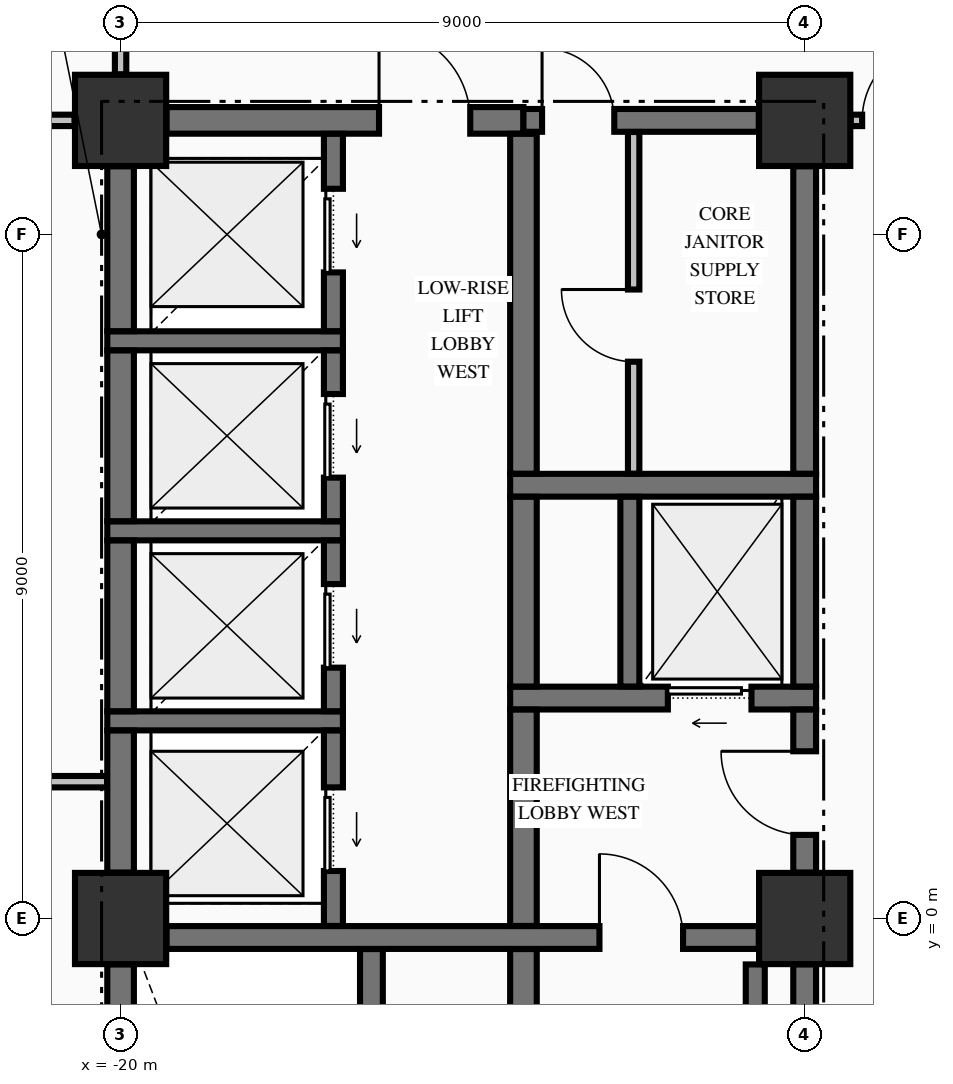
"""IFC4 building model, lengths in metres.
Left out: names, types, materials, properties, quantities, classifications, styles, units other than length and angle.
Written with IfcOpenShell. Run it as: python <this file> out.ifc"""

import sys

from ifc_helpers import new_model, si_unit, direction, frame, frame_2d, origin, origin_2d, place, context, subcontext, project, spatial, rectangle, extrude, element, fill, save


model = new_model("IFC4")
c1 = context("Model", 3, precision=1e-05, world=origin(), true_north=direction((0.0, 1.0)))
c2 = subcontext(c1, "Body", "Model", "MODEL_VIEW")
j1 = project(units=[si_unit("LENGTHUNIT", "METRE"), si_unit("PLANEANGLEUNIT", "RADIAN")], contexts=[c1])
p1 = place(None, origin())
s1 = spatial("IfcSite", under=j1, at=p1, CompositionType="ELEMENT")
p2 = place(p1, origin())
s2 = spatial("IfcBuilding", under=s1, at=p2, CompositionType="ELEMENT")
p3 = place(p2, frame((0.0, 0.0, 64.33)))
s3 = spatial("IfcBuildingStorey", under=s2, at=p3, CompositionType="ELEMENT", Elevation=64.33)
for number, where, z_axis, x_axis in (
    (1, (-20.0, 10.5, -0.25), (0.0, 0.0, 1.0), (1.0, 0.0, 0.0)),
    (2, (-11.0, 0.0, -0.25), (0.0, 0.0, 1.0), (1.0, 0.0, 0.0)),
    (3, (-11.0, 10.5, -0.25), (0.0, 0.0, 1.0), (1.0, 0.0, 0.0)),
    (4, (-20.0, 0.0, -0.25), (0.0, 0.0, 1.0), (1.0, 0.0, 0.0)),
):
    element("IfcColumn", number, at=place(p3, frame(where, z_axis=z_axis, x_axis=x_axis)), inside=s3, PredefinedType="COLUMN", context=c2, shape_type="SweptSolid", body=[
        extrude(rectangle(XDim=1.2, YDim=1.2, at=origin_2d()), origin(), (0.0, 0.0, 1.0), 3.57),
    ])
p4 = place(p3, frame((-19.396, -0.25, 0.0), z_axis=(0.0, 0.0, 1.0), x_axis=(1.0, 0.0, 0.0)))
e5 = element("IfcWall", 5, at=p4, inside=s3, PredefinedType="SHEAR", context=c2, shape_type="SweptSolid", body=[
    extrude(rectangle(XDim=7.792, YDim=0.3, at=frame_2d((3.896, 0.0))), origin(), (0.0, 0.0, 1.0), 3.32),
])
p5 = place(p4, frame((5.696, 0.0, 0.0)))
e6 = element("IfcOpeningElement", 6, at=p5, cuts=e5, PredefinedType="OPENING", context=c2, shape_type="SweptSolid", body=[
    extrude(rectangle(XDim=1.1, YDim=2.15, at=frame_2d((0.55, 1.075))), frame((0.0, 0.16, 0.0), z_axis=(0.0, -1.0, 0.0), x_axis=(1.0, 0.0, 0.0)), (0.0, 0.0, 1.0), 0.32),
])
p6 = place(p3, frame((-20.175, 2.6, 0.0), z_axis=(0.0, 0.0, 1.0), x_axis=(1.0, 0.0, 0.0)))
e7 = element("IfcWall", 7, at=p6, inside=s3, PredefinedType="SOLIDWALL", context=c2, shape_type="SweptSolid", body=[
    extrude(rectangle(XDim=3.1, YDim=0.25, at=frame_2d((1.55, 0.0))), origin(), (0.0, 0.0, 1.0), 3.32),
])
p7 = place(p3, frame((-14.875, 2.9, 0.0), z_axis=(0.0, 0.0, 1.0), x_axis=(1.0, 0.0, 0.0)))
e8 = element("IfcWall", 8, at=p7, inside=s3, PredefinedType="SHEAR", context=c2, shape_type="SweptSolid", body=[
    extrude(rectangle(XDim=4.025, YDim=0.3, at=frame_2d((2.012, 0.0))), origin(), (0.0, 0.0, 1.0), 3.32),
])
p8 = place(p7, frame((2.075, 0.0, 0.0)))
e9 = element("IfcOpeningElement", 9, at=p8, cuts=e8, PredefinedType="OPENING", context=c2, shape_type="SweptSolid", body=[
    extrude(rectangle(XDim=1.1, YDim=2.2, at=frame_2d((0.55, 1.1))), frame((0.0, 0.16, 0.0), z_axis=(0.0, -1.0, 0.0), x_axis=(1.0, 0.0, 0.0)), (0.0, 0.0, 1.0), 0.32),
])
p9 = place(p3, frame((-20.175, 5.1, 0.0), z_axis=(0.0, 0.0, 1.0), x_axis=(1.0, 0.0, 0.0)))
e10 = element("IfcWall", 10, at=p9, inside=s3, PredefinedType="SOLIDWALL", context=c2, shape_type="SweptSolid", body=[
    extrude(rectangle(XDim=3.1, YDim=0.25, at=frame_2d((1.55, 0.0))), origin(), (0.0, 0.0, 1.0), 3.32),
])
p10 = place(p3, frame((-14.875, 5.7, 0.0), z_axis=(0.0, 0.0, 1.0), x_axis=(1.0, 0.0, 0.0)))
e11 = element("IfcWall", 11, at=p10, inside=s3, PredefinedType="SHEAR", context=c2, shape_type="SweptSolid", body=[
    extrude(rectangle(XDim=4.025, YDim=0.3, at=frame_2d((2.012, 0.0))), origin(), (0.0, 0.0, 1.0), 3.32),
])
p11 = place(p3, frame((-20.175, 7.6, 0.0), z_axis=(0.0, 0.0, 1.0), x_axis=(1.0, 0.0, 0.0)))
e12 = element("IfcWall", 12, at=p11, inside=s3, PredefinedType="SOLIDWALL", context=c2, shape_type="SweptSolid", body=[
    extrude(rectangle(XDim=3.1, YDim=0.25, at=frame_2d((1.55, 0.0))), origin(), (0.0, 0.0, 1.0), 3.32),
])
p12 = place(p3, frame((-19.396, 10.5, 0.0), z_axis=(0.0, 0.0, 1.0), x_axis=(1.0, 0.0, 0.0)))
e13 = element("IfcWall", 13, at=p12, inside=s3, PredefinedType="SHEAR", context=c2, shape_type="SweptSolid", body=[
    extrude(rectangle(XDim=4.696, YDim=0.35, at=frame_2d((2.348, 0.0))), origin(), (0.0, 0.0, 1.0), 3.32),
])
p13 = place(p12, frame((2.796, 0.0, 0.0)))
e14 = element("IfcOpeningElement", 14, at=p13, cuts=e13, PredefinedType="OPENING", context=c2, shape_type="SweptSolid", body=[
    extrude(rectangle(XDim=1.2, YDim=2.15, at=frame_2d((0.6, 1.075))), frame((0.0, 0.185, 0.0), z_axis=(0.0, -1.0, 0.0), x_axis=(1.0, 0.0, 0.0)), (0.0, 0.0, 1.0), 0.37),
])
p14 = place(p3, frame((-14.7, 10.5, 0.0), z_axis=(0.0, 0.0, 1.0), x_axis=(1.0, 0.0, 0.0)))
e15 = element("IfcWall", 15, at=p14, inside=s3, PredefinedType="SHEAR", context=c2, shape_type="SweptSolid", body=[
    extrude(rectangle(XDim=3.096, YDim=0.3, at=frame_2d((1.548, 0.0))), origin(), (0.0, 0.0, 1.0), 3.32),
])
p15 = place(p14, frame((0.245, 0.0, 0.0)))
e16 = element("IfcOpeningElement", 16, at=p15, cuts=e15, PredefinedType="OPENING", context=c2, shape_type="SweptSolid", body=[
    extrude(rectangle(XDim=0.95, YDim=2.15, at=frame_2d((0.475, 1.075))), frame((0.0, 0.16, 0.0), z_axis=(0.0, -1.0, 0.0), x_axis=(1.0, 0.0, 0.0)), (0.0, 0.0, 1.0), 0.32),
])
p16 = place(p3, frame((-28.835, 1.8, 0.0), z_axis=(0.0, 0.0, 1.0), x_axis=(1.0, 0.0, 0.0)))
e17 = element("IfcWall", 17, at=p16, inside=s3, PredefinedType="PARTITIONING", context=c2, shape_type="SweptSolid", body=[
    extrude(rectangle(XDim=8.657, YDim=0.15, at=frame_2d((4.329, 0.0))), origin(), (0.0, 0.0, 1.0), 3.32),
])
p17 = place(p3, frame((-28.835, 10.5, 0.0), z_axis=(0.0, 0.0, 1.0), x_axis=(1.0, 0.0, 0.0)))
e18 = element("IfcWall", 18, at=p17, inside=s3, PredefinedType="PARTITIONING", context=c2, shape_type="SweptSolid", body=[
    extrude(rectangle(XDim=8.229, YDim=0.15, at=frame_2d((4.115, 0.0))), origin(), (0.0, 0.0, 1.0), 3.32),
])
p18 = place(p17, frame((3.86, 0.0, 0.0)))
e19 = element("IfcOpeningElement", 19, at=p18, cuts=e18, PredefinedType="OPENING", context=c2, shape_type="SweptSolid", body=[
    extrude(rectangle(XDim=0.95, YDim=2.15, at=frame_2d((0.475, 1.075))), frame((0.0, 0.085, 0.0), z_axis=(0.0, -1.0, 0.0), x_axis=(1.0, 0.0, 0.0)), (0.0, 0.0, 1.0), 0.17),
])
p19 = place(p3, frame((-10.394, 10.5, 0.0), z_axis=(0.0, 0.0, 1.0), x_axis=(1.0, 0.0, 0.0)))
e20 = element("IfcWall", 20, at=p19, inside=s3, PredefinedType="PARTITIONING", context=c2, shape_type="SweptSolid", body=[
    extrude(rectangle(XDim=20.788, YDim=0.15, at=frame_2d((10.394, 0.0))), origin(), (0.0, 0.0, 1.0), 3.32),
])
p20 = place(p19, frame((0.15, 0.0, 0.0)))
e21 = element("IfcOpeningElement", 21, at=p20, cuts=e20, PredefinedType="OPENING", context=c2, shape_type="SweptSolid", body=[
    extrude(rectangle(XDim=1.05, YDim=2.15, at=frame_2d((0.525, 1.075))), frame((0.0, 0.085, 0.0), z_axis=(0.0, -1.0, 0.0), x_axis=(1.0, 0.0, 0.0)), (0.0, 0.0, 1.0), 0.17),
])
p21 = place(p19, frame((19.588, 0.0, 0.0)))
e22 = element("IfcOpeningElement", 22, at=p21, cuts=e20, PredefinedType="OPENING", context=c2, shape_type="SweptSolid", body=[
    extrude(rectangle(XDim=1.05, YDim=2.15, at=frame_2d((0.525, 1.075))), frame((0.0, 0.085, 0.0), z_axis=(0.0, -1.0, 0.0), x_axis=(1.0, 0.0, 0.0)), (0.0, 0.0, 1.0), 0.17),
])
p22 = place(p3, frame((-20.0, -9.346, 0.0), z_axis=(0.0, 0.0, 1.0), x_axis=(0.0, 1.0, 0.0)))
e23 = element("IfcWall", 23, at=p22, inside=s3, PredefinedType="SHEAR", context=c2, shape_type="SweptSolid", body=[
    extrude(rectangle(XDim=8.742, YDim=0.35, at=frame_2d((4.371, 0.0))), origin(), (0.0, 0.0, 1.0), 3.32),
])
p23 = place(p3, frame((-20.0, 0.604, 0.0), z_axis=(0.0, 0.0, 1.0), x_axis=(0.0, 1.0, 0.0)))
e24 = element("IfcWall", 24, at=p23, inside=s3, PredefinedType="SHEAR", context=c2, shape_type="SweptSolid", body=[
    extrude(rectangle(XDim=1.869, YDim=0.35, at=frame_2d((0.935, 0.0))), origin(), (0.0, 0.0, 1.0), 3.32),
])
for number, where, z_axis, x_axis in (
    (25, (-20.0, 2.727, 0.0), (0.0, 0.0, 1.0), (0.0, 1.0, 0.0)),
    (26, (-20.0, 5.227, 0.0), (0.0, 0.0, 1.0), (0.0, 1.0, 0.0)),
):
    element("IfcWall", number, at=place(p3, frame(where, z_axis=z_axis, x_axis=x_axis)), inside=s3, PredefinedType="SHEAR", context=c2, shape_type="SweptSolid", body=[
        extrude(rectangle(XDim=2.246, YDim=0.35, at=frame_2d((1.123, 0.0))), origin(), (0.0, 0.0, 1.0), 3.32),
    ])
p24 = place(p3, frame((-20.0, 7.727, 0.0), z_axis=(0.0, 0.0, 1.0), x_axis=(0.0, 1.0, 0.0)))
e27 = element("IfcWall", 27, at=p24, inside=s3, PredefinedType="SHEAR", context=c2, shape_type="SweptSolid", body=[
    extrude(rectangle(XDim=2.169, YDim=0.35, at=frame_2d((1.084, 0.0))), origin(), (0.0, 0.0, 1.0), 3.32),
])
p25 = place(p3, frame((-17.2, -0.098, 0.0), z_axis=(0.0, 0.0, 1.0), x_axis=(0.0, 1.0, 0.0)))
e28 = element("IfcWall", 28, at=p25, inside=s3, PredefinedType="SOLIDWALL", context=c2, shape_type="SweptSolid", body=[
    extrude(rectangle(XDim=2.571, YDim=0.25, at=frame_2d((1.285, 0.0))), origin(), (0.0, 0.0, 1.0), 3.32),
])
p26 = place(p25, frame((0.723, 0.0, 0.0)))
e29 = element("IfcOpeningElement", 29, at=p26, cuts=e28, PredefinedType="OPENING", context=c2, shape_type="SweptSolid", body=[
    extrude(rectangle(XDim=1.1, YDim=2.2, at=frame_2d((0.55, 1.1))), frame((0.0, 0.135, 0.0), z_axis=(0.0, -1.0, 0.0), x_axis=(1.0, 0.0, 0.0)), (0.0, 0.0, 1.0), 0.27),
])
p27 = place(p3, frame((-17.2, 2.727, 0.0), z_axis=(0.0, 0.0, 1.0), x_axis=(0.0, 1.0, 0.0)))
e30 = element("IfcWall", 30, at=p27, inside=s3, PredefinedType="SOLIDWALL", context=c2, shape_type="SweptSolid", body=[
    extrude(rectangle(XDim=2.246, YDim=0.25, at=frame_2d((1.123, 0.0))), origin(), (0.0, 0.0, 1.0), 3.32),
])
p28 = place(p27, frame((0.573, 0.0, 0.0)))
e31 = element("IfcOpeningElement", 31, at=p28, cuts=e30, PredefinedType="OPENING", context=c2, shape_type="SweptSolid", body=[
    extrude(rectangle(XDim=1.1, YDim=2.2, at=frame_2d((0.55, 1.1))), frame((0.0, 0.135, 0.0), z_axis=(0.0, -1.0, 0.0), x_axis=(1.0, 0.0, 0.0)), (0.0, 0.0, 1.0), 0.27),
])
p29 = place(p3, frame((-17.2, 5.227, 0.0), z_axis=(0.0, 0.0, 1.0), x_axis=(0.0, 1.0, 0.0)))
e32 = element("IfcWall", 32, at=p29, inside=s3, PredefinedType="SOLIDWALL", context=c2, shape_type="SweptSolid", body=[
    extrude(rectangle(XDim=2.246, YDim=0.25, at=frame_2d((1.123, 0.0))), origin(), (0.0, 0.0, 1.0), 3.32),
])
p30 = place(p29, frame((0.573, 0.0, 0.0)))
e33 = element("IfcOpeningElement", 33, at=p30, cuts=e32, PredefinedType="OPENING", context=c2, shape_type="SweptSolid", body=[
    extrude(rectangle(XDim=1.1, YDim=2.2, at=frame_2d((0.55, 1.1))), frame((0.0, 0.135, 0.0), z_axis=(0.0, -1.0, 0.0), x_axis=(1.0, 0.0, 0.0)), (0.0, 0.0, 1.0), 0.27),
])
p31 = place(p3, frame((-17.2, 7.727, 0.0), z_axis=(0.0, 0.0, 1.0), x_axis=(0.0, 1.0, 0.0)))
e34 = element("IfcWall", 34, at=p31, inside=s3, PredefinedType="SOLIDWALL", context=c2, shape_type="SweptSolid", body=[
    extrude(rectangle(XDim=2.596, YDim=0.25, at=frame_2d((1.298, 0.0))), origin(), (0.0, 0.0, 1.0), 3.32),
])
p32 = place(p31, frame((0.773, 0.0, 0.0)))
e35 = element("IfcOpeningElement", 35, at=p32, cuts=e34, PredefinedType="OPENING", context=c2, shape_type="SweptSolid", body=[
    extrude(rectangle(XDim=1.1, YDim=2.2, at=frame_2d((0.55, 1.1))), frame((0.0, 0.135, 0.0), z_axis=(0.0, -1.0, 0.0), x_axis=(1.0, 0.0, 0.0)), (0.0, 0.0, 1.0), 0.27),
])
p33 = place(p3, frame((-16.7, -9.773, 0.0), z_axis=(0.0, 0.0, 1.0), x_axis=(0.0, 1.0, 0.0)))
e36 = element("IfcWall", 36, at=p33, inside=s3, PredefinedType="SHEAR", context=c2, shape_type="SweptSolid", body=[
    extrude(rectangle(XDim=9.371, YDim=0.3, at=frame_2d((4.686, 0.0))), origin(), (0.0, 0.0, 1.0), 3.32),
])
p34 = place(p3, frame((-14.7, -9.773, 0.0), z_axis=(0.0, 0.0, 1.0), x_axis=(0.0, 1.0, 0.0)))
e37 = element("IfcWall", 37, at=p34, inside=s3, PredefinedType="SHEAR", context=c2, shape_type="SweptSolid", body=[
    extrude(rectangle(XDim=9.371, YDim=0.35, at=frame_2d((4.686, 0.0))), origin(), (0.0, 0.0, 1.0), 3.32),
])
p35 = place(p3, frame((-14.7, -0.098, 0.0), z_axis=(0.0, 0.0, 1.0), x_axis=(0.0, 1.0, 0.0)))
e38 = element("IfcWall", 38, at=p35, inside=s3, PredefinedType="SHEAR", context=c2, shape_type="SweptSolid", body=[
    extrude(rectangle(XDim=2.846, YDim=0.35, at=frame_2d((1.423, 0.0))), origin(), (0.0, 0.0, 1.0), 3.32),
])
p36 = place(p3, frame((-14.7, 3.052, 0.0), z_axis=(0.0, 0.0, 1.0), x_axis=(0.0, 1.0, 0.0)))
e39 = element("IfcWall", 39, at=p36, inside=s3, PredefinedType="SHEAR", context=c2, shape_type="SweptSolid", body=[
    extrude(rectangle(XDim=2.496, YDim=0.35, at=frame_2d((1.248, 0.0))), origin(), (0.0, 0.0, 1.0), 3.32),
])
p37 = place(p3, frame((-14.7, 5.852, 0.0), z_axis=(0.0, 0.0, 1.0), x_axis=(0.0, 1.0, 0.0)))
e40 = element("IfcWall", 40, at=p37, inside=s3, PredefinedType="SHEAR", context=c2, shape_type="SweptSolid", body=[
    extrude(rectangle(XDim=4.471, YDim=0.35, at=frame_2d((2.235, 0.0))), origin(), (0.0, 0.0, 1.0), 3.32),
])
p38 = place(p3, frame((-13.3, 3.052, 0.0), z_axis=(0.0, 0.0, 1.0), x_axis=(0.0, 1.0, 0.0)))
e41 = element("IfcWall", 41, at=p38, inside=s3, PredefinedType="SOLIDWALL", context=c2, shape_type="SweptSolid", body=[
    extrude(rectangle(XDim=2.496, YDim=0.25, at=frame_2d((1.248, 0.0))), origin(), (0.0, 0.0, 1.0), 3.32),
])
p39 = place(p3, frame((-11.65, -9.346, 0.0), z_axis=(0.0, 0.0, 1.0), x_axis=(0.0, 1.0, 0.0)))
e42 = element("IfcWall", 42, at=p39, inside=s3, PredefinedType="SOLIDWALL", context=c2, shape_type="SweptSolid", body=[
    extrude(rectangle(XDim=8.742, YDim=0.25, at=frame_2d((4.371, 0.0))), origin(), (0.0, 0.0, 1.0), 3.32),
])
p40 = place(p3, frame((-11.0, -9.346, 0.0), z_axis=(0.0, 0.0, 1.0), x_axis=(0.0, 1.0, 0.0)))
e43 = element("IfcWall", 43, at=p40, inside=s3, PredefinedType="SHEAR", context=c2, shape_type="SweptSolid", body=[
    extrude(rectangle(XDim=8.742, YDim=0.3, at=frame_2d((4.371, 0.0))), origin(), (0.0, 0.0, 1.0), 3.32),
])
p41 = place(p3, frame((-11.0, 0.604, 0.0), z_axis=(0.0, 0.0, 1.0), x_axis=(0.0, 1.0, 0.0)))
e44 = element("IfcWall", 44, at=p41, inside=s3, PredefinedType="SHEAR", context=c2, shape_type="SweptSolid", body=[
    extrude(rectangle(XDim=2.144, YDim=0.3, at=frame_2d((1.072, 0.0))), origin(), (0.0, 0.0, 1.0), 3.32),
])
p42 = place(p41, frame((0.496, 0.0, 0.0)))
e45 = element("IfcOpeningElement", 45, at=p42, cuts=e44, PredefinedType="OPENING", context=c2, shape_type="SweptSolid", body=[
    extrude(rectangle(XDim=1.1, YDim=2.15, at=frame_2d((0.55, 1.075))), frame((0.0, 0.16, 0.0), z_axis=(0.0, -1.0, 0.0), x_axis=(1.0, 0.0, 0.0)), (0.0, 0.0, 1.0), 0.32),
])
p43 = place(p3, frame((-11.0, 3.052, 0.0), z_axis=(0.0, 0.0, 1.0), x_axis=(0.0, 1.0, 0.0)))
e46 = element("IfcWall", 46, at=p43, inside=s3, PredefinedType="SHEAR", context=c2, shape_type="SweptSolid", body=[
    extrude(rectangle(XDim=2.496, YDim=0.3, at=frame_2d((1.248, 0.0))), origin(), (0.0, 0.0, 1.0), 3.32),
])
p44 = place(p3, frame((-11.0, 5.852, 0.0), z_axis=(0.0, 0.0, 1.0), x_axis=(0.0, 1.0, 0.0)))
e47 = element("IfcWall", 47, at=p44, inside=s3, PredefinedType="SHEAR", context=c2, shape_type="SweptSolid", body=[
    extrude(rectangle(XDim=4.044, YDim=0.3, at=frame_2d((2.022, 0.0))), origin(), (0.0, 0.0, 1.0), 3.32),
])
p45 = place(p3, frame((-20.0, 11.106, 0.0), z_axis=(0.0, 0.0, 1.0), x_axis=(0.0, 1.0, 0.0)))
e48 = element("IfcWall", 48, at=p45, inside=s3, PredefinedType="PARTITIONING", context=c2, shape_type="SweptSolid", body=[
    extrude(rectangle(XDim=2.166, YDim=0.15, at=frame_2d((1.083, 0.0))), origin(), (0.0, 0.0, 1.0), 2.66),
])
p46 = place(p45, frame((0.349, 0.0, 0.0)))
e49 = element("IfcOpeningElement", 49, at=p46, cuts=e48, PredefinedType="OPENING", context=c2, shape_type="SweptSolid", body=[
    extrude(rectangle(XDim=0.95, YDim=2.15, at=frame_2d((0.475, 1.075))), frame((0.0, 0.085, 0.0), z_axis=(0.0, -1.0, 0.0), x_axis=(1.0, 0.0, 0.0)), (0.0, 0.0, 1.0), 0.17),
])
p47 = place(p3, frame((-13.25, 5.853, 0.0), z_axis=(0.0, 0.0, 1.0), x_axis=(0.0, 1.0, 0.0)))
e50 = element("IfcWall", 50, at=p47, inside=s3, PredefinedType="PARTITIONING", context=c2, shape_type="SweptSolid", body=[
    extrude(rectangle(XDim=4.494, YDim=0.15, at=frame_2d((2.247, 0.0))), origin(), (0.0, 0.0, 1.0), 3.32),
])
p48 = place(p47, frame((1.472, 0.0, 0.0)))
e51 = element("IfcOpeningElement", 51, at=p48, cuts=e50, PredefinedType="OPENING", context=c2, shape_type="SweptSolid", body=[
    extrude(rectangle(XDim=0.95, YDim=2.15, at=frame_2d((0.475, 1.075))), frame((0.0, 0.085, 0.0), z_axis=(0.0, -1.0, 0.0), x_axis=(1.0, 0.0, 0.0)), (0.0, 0.0, 1.0), 0.17),
])
p49 = place(p5, origin())
e52 = element("IfcDoor", 52, at=p49, inside=s3, OperationType="SINGLE_SWING_LEFT", PredefinedType="DOOR", context=c2, shape_type="SweptSolid", body=[
    extrude(rectangle(XDim=1.1, YDim=2.15, at=frame_2d((0.55, 1.075))), frame((0.0, 0.025, 0.0), z_axis=(0.0, -1.0, 0.0), x_axis=(1.0, 0.0, 0.0)), (0.0, 0.0, 1.0), 0.05),
])
fill(e6, e52)
p50 = place(p42, origin())
e53 = element("IfcDoor", 53, at=p50, inside=s3, OperationType="SINGLE_SWING_RIGHT", PredefinedType="DOOR", context=c2, shape_type="SweptSolid", body=[
    extrude(rectangle(XDim=1.1, YDim=2.15, at=frame_2d((0.55, 1.075))), frame((0.0, 0.025, 0.0), z_axis=(0.0, -1.0, 0.0), x_axis=(1.0, 0.0, 0.0)), (0.0, 0.0, 1.0), 0.05),
])
fill(e45, e53)
p51 = place(p8, origin())
e54 = element("IfcDoor", 54, at=p51, inside=s3, OperationType="SLIDING_TO_LEFT", PredefinedType="DOOR", context=c2, shape_type="SweptSolid", body=[
    extrude(rectangle(XDim=1.1, YDim=2.2, at=frame_2d((0.55, 1.1))), frame((0.0, 0.025, 0.0), z_axis=(0.0, -1.0, 0.0), x_axis=(1.0, 0.0, 0.0)), (0.0, 0.0, 1.0), 0.05),
])
fill(e9, e54)
p52 = place(p15, origin())
e55 = element("IfcDoor", 55, at=p52, inside=s3, OperationType="SINGLE_SWING_LEFT", PredefinedType="DOOR", context=c2, shape_type="SweptSolid", body=[
    extrude(rectangle(XDim=0.95, YDim=2.15, at=frame_2d((0.475, 1.075))), frame((0.0, 0.025, 0.0), z_axis=(0.0, -1.0, 0.0), x_axis=(1.0, 0.0, 0.0)), (0.0, 0.0, 1.0), 0.05),
])
fill(e16, e55)
p53 = place(p48, origin())
e56 = element("IfcDoor", 56, at=p53, inside=s3, OperationType="SINGLE_SWING_RIGHT", PredefinedType="DOOR", context=c2, shape_type="SweptSolid", body=[
    extrude(rectangle(XDim=0.95, YDim=2.15, at=frame_2d((0.475, 1.075))), frame((0.0, 0.025, 0.0), z_axis=(0.0, -1.0, 0.0), x_axis=(1.0, 0.0, 0.0)), (0.0, 0.0, 1.0), 0.05),
])
fill(e51, e56)
p54 = place(p13, origin())
e57 = element("IfcDoor", 57, at=p54, inside=s3, OperationType="SINGLE_SWING_LEFT", PredefinedType="DOOR", context=c2, shape_type="SweptSolid", body=[
    extrude(rectangle(XDim=1.2, YDim=2.15, at=frame_2d((0.6, 1.075))), frame((0.0, 0.025, 0.0), z_axis=(0.0, -1.0, 0.0), x_axis=(1.0, 0.0, 0.0)), (0.0, 0.0, 1.0), 0.05),
])
fill(e14, e57)
p55 = place(p26, origin())
e58 = element("IfcDoor", 58, at=p55, inside=s3, OperationType="SLIDING_TO_LEFT", PredefinedType="DOOR", context=c2, shape_type="SweptSolid", body=[
    extrude(rectangle(XDim=1.1, YDim=2.2, at=frame_2d((0.55, 1.1))), frame((0.0, 0.025, 0.0), z_axis=(0.0, -1.0, 0.0), x_axis=(1.0, 0.0, 0.0)), (0.0, 0.0, 1.0), 0.05),
])
fill(e29, e58)
p56 = place(p28, origin())
e59 = element("IfcDoor", 59, at=p56, inside=s3, OperationType="SLIDING_TO_LEFT", PredefinedType="DOOR", context=c2, shape_type="SweptSolid", body=[
    extrude(rectangle(XDim=1.1, YDim=2.2, at=frame_2d((0.55, 1.1))), frame((0.0, 0.025, 0.0), z_axis=(0.0, -1.0, 0.0), x_axis=(1.0, 0.0, 0.0)), (0.0, 0.0, 1.0), 0.05),
])
fill(e31, e59)
p57 = place(p30, origin())
e60 = element("IfcDoor", 60, at=p57, inside=s3, OperationType="SLIDING_TO_LEFT", PredefinedType="DOOR", context=c2, shape_type="SweptSolid", body=[
    extrude(rectangle(XDim=1.1, YDim=2.2, at=frame_2d((0.55, 1.1))), frame((0.0, 0.025, 0.0), z_axis=(0.0, -1.0, 0.0), x_axis=(1.0, 0.0, 0.0)), (0.0, 0.0, 1.0), 0.05),
])
fill(e33, e60)
p58 = place(p32, origin())
e61 = element("IfcDoor", 61, at=p58, inside=s3, OperationType="SLIDING_TO_LEFT", PredefinedType="DOOR", context=c2, shape_type="SweptSolid", body=[
    extrude(rectangle(XDim=1.1, YDim=2.2, at=frame_2d((0.55, 1.1))), frame((0.0, 0.025, 0.0), z_axis=(0.0, -1.0, 0.0), x_axis=(1.0, 0.0, 0.0)), (0.0, 0.0, 1.0), 0.05),
])
fill(e35, e61)
p59 = place(p20, origin())
e62 = element("IfcDoor", 62, at=p59, inside=s3, OperationType="SINGLE_SWING_RIGHT", PredefinedType="DOOR", context=c2, shape_type="SweptSolid", body=[
    extrude(rectangle(XDim=1.05, YDim=2.15, at=frame_2d((0.525, 1.075))), frame((0.0, 0.025, 0.0), z_axis=(0.0, -1.0, 0.0), x_axis=(1.0, 0.0, 0.0)), (0.0, 0.0, 1.0), 0.05),
])
fill(e21, e62)
save(model, sys.argv[1])
